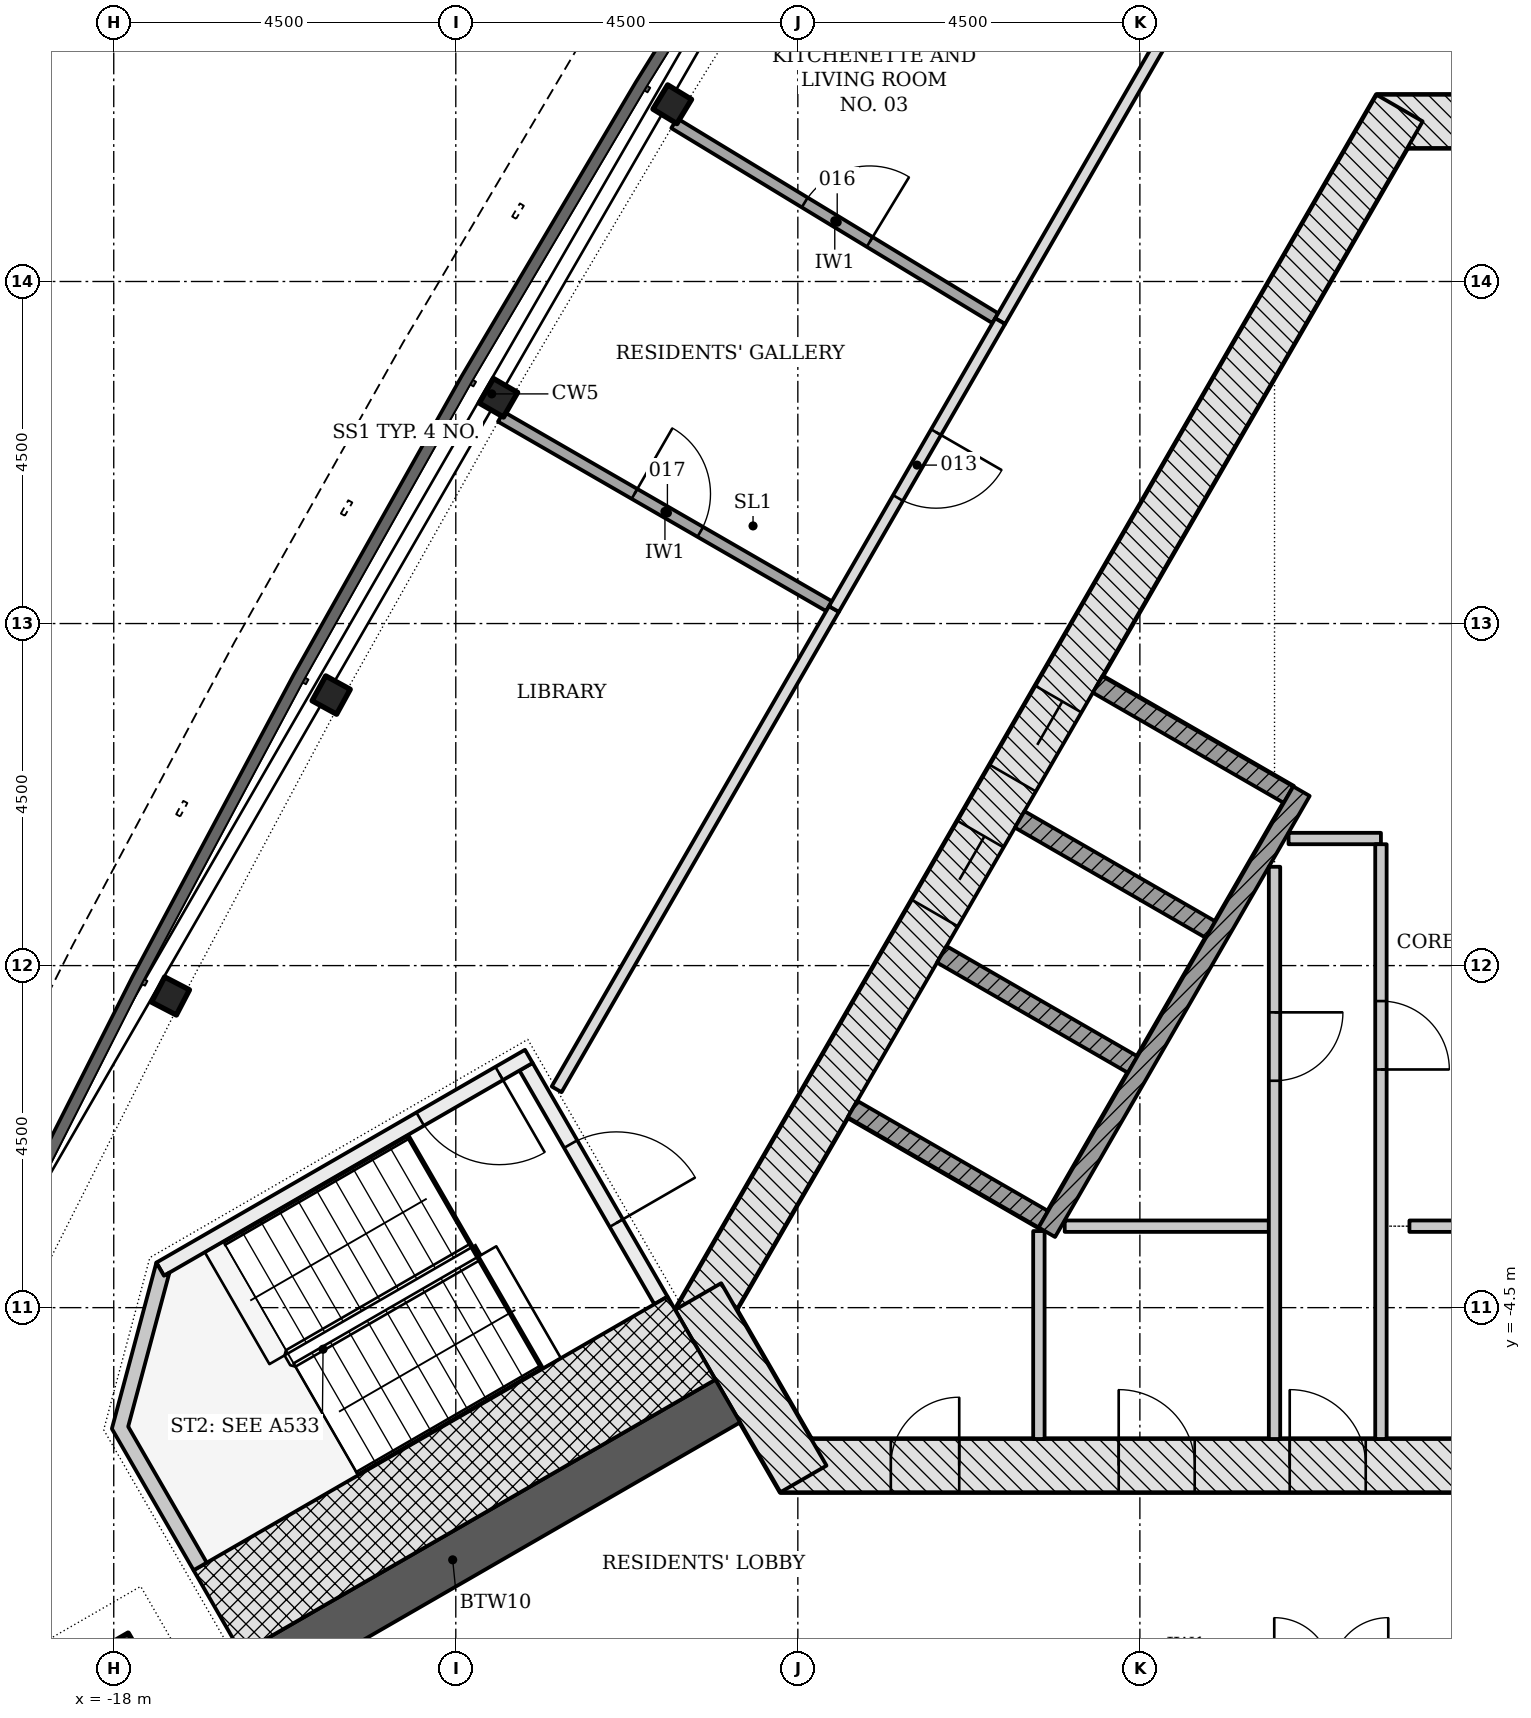
"""IFC4 building model, lengths in metres.
Left out: names, types, materials, properties, quantities, classifications, styles, units other than length and angle.
Written with IfcOpenShell. Run it as: python <this file> out.ifc"""

import sys

from ifc_helpers import new_model, si_unit, direction, frame, frame_2d, origin, origin_2d, place, context, subcontext, project, spatial, polyline, rectangle, i_section, outline, extrude, element, fill, save


model = new_model("IFC4")
c1 = context("Model", 3, precision=1e-05, world=origin(), true_north=direction((0.0, 1.0)))
c2 = subcontext(c1, "Body", "Model", "MODEL_VIEW")
j1 = project(units=[si_unit("LENGTHUNIT", "METRE"), si_unit("PLANEANGLEUNIT", "RADIAN")], contexts=[c1])
p1 = place(None, origin())
s1 = spatial("IfcSite", under=j1, at=p1, CompositionType="ELEMENT")
p2 = place(p1, origin())
s2 = spatial("IfcBuilding", under=s1, at=p2, CompositionType="ELEMENT")
p3 = place(p2, frame((0.0, 0.0, 214.8)))
s3 = spatial("IfcBuildingStorey", under=s2, at=p3, CompositionType="ELEMENT", Elevation=214.8)
p4 = place(p3, frame((-9.229, -6.578, -0.2), z_axis=(0.0, 0.0, 1.0), x_axis=(1.0, 0.0, 0.0)))
e1 = element("IfcWall", 1, at=p4, inside=s3, PredefinedType="SHEAR", context=c2, shape_type="SweptSolid", body=[
    extrude(rectangle(XDim=18.458, YDim=0.7, at=frame_2d((9.229, 0.0))), origin(), (0.0, 0.0, 1.0), 3.6),
])
p5 = place(p4, frame((6.7, 0.0, 0.2)))
e2 = element("IfcOpeningElement", 2, at=p5, cuts=e1, PredefinedType="OPENING", context=c2, shape_type="SweptSolid", body=[
    extrude(rectangle(XDim=1.0, YDim=2.1, at=frame_2d((0.5, 1.05))), frame((0.0, 0.36, 0.0), z_axis=(0.0, -1.0, 0.0), x_axis=(1.0, 0.0, 0.0)), (0.0, 0.0, 1.0), 0.72),
])
p6 = place(p4, frame((1.452, 0.0, 0.2)))
e3 = element("IfcOpeningElement", 3, at=p6, cuts=e1, PredefinedType="OPENING", context=c2, shape_type="SweptSolid", body=[
    extrude(rectangle(XDim=0.9, YDim=2.1, at=frame_2d((0.45, 1.05))), frame((0.0, 0.36, 0.0), z_axis=(0.0, -1.0, 0.0), x_axis=(1.0, 0.0, 0.0)), (0.0, 0.0, 1.0), 0.72),
])
p7 = place(p4, frame((4.45, 0.0, 0.2)))
e4 = element("IfcOpeningElement", 4, at=p7, cuts=e1, PredefinedType="OPENING", context=c2, shape_type="SweptSolid", body=[
    extrude(rectangle(XDim=1.0, YDim=2.1, at=frame_2d((0.5, 1.05))), frame((0.0, 0.36, 0.0), z_axis=(0.0, -1.0, 0.0), x_axis=(1.0, 0.0, 0.0)), (0.0, 0.0, 1.0), 0.72),
])
p8 = place(p4, frame((12.477, 0.0, 0.2)))
e5 = element("IfcOpeningElement", 5, at=p8, cuts=e1, PredefinedType="OPENING", context=c2, shape_type="SweptSolid", body=[
    extrude(rectangle(XDim=1.0, YDim=2.1, at=frame_2d((0.5, 1.05))), frame((0.0, 0.36, 0.0), z_axis=(0.0, -1.0, 0.0), x_axis=(1.0, 0.0, 0.0)), (0.0, 0.0, 1.0), 0.72),
])
p9 = place(p3, frame((1.386, 11.106, -0.2), z_axis=(0.0, 0.0, 1.0), x_axis=(-1.0, 0.0, 0.0)))
e6 = element("IfcWall", 6, at=p9, inside=s3, PredefinedType="SHEAR", context=c2, shape_type="SweptSolid", body=[
    extrude(rectangle(XDim=2.771, YDim=0.7, at=frame_2d((1.386, 0.0))), origin(), (0.0, 0.0, 1.0), 3.6),
])
p10 = place(p3, frame((-1.083, 11.281, -0.2), z_axis=(0.0, 0.0, 1.0), x_axis=(-0.500001446645, -0.866024568562, 0.0)))
e7 = element("IfcWall", 7, at=p10, inside=s3, PredefinedType="SHEAR", context=c2, shape_type="SweptSolid", body=[
    extrude(rectangle(XDim=18.458, YDim=0.7, at=frame_2d((9.229, 0.0))), origin(), (0.0, 0.0, 1.0), 3.6),
])
p11 = place(p10, frame((8.979, 0.0, 0.2)))
e8 = element("IfcOpeningElement", 8, at=p11, cuts=e7, PredefinedType="OPENING", context=c2, shape_type="SweptSolid", body=[
    extrude(rectangle(XDim=1.2, YDim=2.1, at=frame_2d((0.6, 1.05))), frame((0.0, 0.36, 0.0), z_axis=(0.0, -1.0, 0.0), x_axis=(1.0, 0.0, 0.0)), (0.0, 0.0, 1.0), 0.72),
])
p12 = place(p10, frame((11.029, 0.0, 0.2)))
e9 = element("IfcOpeningElement", 9, at=p12, cuts=e7, PredefinedType="OPENING", context=c2, shape_type="SweptSolid", body=[
    extrude(rectangle(XDim=1.2, YDim=2.1, at=frame_2d((0.6, 1.05))), frame((0.0, 0.36, 0.0), z_axis=(0.0, -1.0, 0.0), x_axis=(1.0, 0.0, 0.0)), (0.0, 0.0, 1.0), 0.72),
])
p13 = place(p3, frame((-10.311, -4.353, -0.2), z_axis=(0.0, 0.0, 1.0), x_axis=(0.500042739161, -0.866000726912, 0.0)))
e10 = element("IfcWall", 10, at=p13, inside=s3, PredefinedType="SHEAR", context=c2, shape_type="SweptSolid", body=[
    extrude(rectangle(XDim=2.771, YDim=0.7, at=frame_2d((1.386, 0.0))), origin(), (0.0, 0.0, 1.0), 3.6),
])
p14 = place(p3, frame((-9.922, -5.728, -0.2), z_axis=(0.0, 0.0, 1.0), x_axis=(-0.866030911543, -0.499990460161, 0.0)))
e11 = element("IfcWall", 11, at=p14, inside=s3, PredefinedType="SHEAR", context=c2, shape_type="SweptSolid", body=[
    extrude(rectangle(XDim=8.359, YDim=0.65, at=frame_2d((4.179, 0.0))), origin(), (0.0, 0.0, 1.0), 3.6),
])
p15 = place(p3, frame((-18.286, -10.558, -0.2), z_axis=(0.0, 0.0, 1.0), x_axis=(-0.866025403784, -0.5, 0.0)))
e12 = element("IfcColumn", 12, at=p15, inside=s3, PredefinedType="COLUMN", context=c2, shape_type="SweptSolid", body=[
    extrude(rectangle(XDim=2.6, YDim=2.6, at=origin_2d()), origin(), (0.0, 0.0, 1.0), 3.6),
])
for number, where, z_axis, x_axis in (
    (13, (-10.652, 11.332, -0.2), (0.0, 0.0, 1.0), (-0.519, -0.855, 0.0)),
    (14, (-12.939, 7.47, -0.2), (0.0, 0.0, 1.0), (-0.5, -0.866, 0.0)),
    (15, (-15.14, 3.559, -0.2), (0.0, 0.0, 1.0), (-0.481, -0.877, 0.0)),
    (16, (-17.253, -0.4, -0.2), (0.0, 0.0, 1.0), (-0.461, -0.887, 0.0)),
):
    element("IfcColumn", number, at=place(p3, frame(where, z_axis=z_axis, x_axis=x_axis)), inside=s3, PredefinedType="COLUMN", context=c2, shape_type="SweptSolid", body=[
        extrude(i_section(OverallWidth=0.373, OverallDepth=0.368, WebThickness=0.015, FlangeThickness=0.024, FilletRadius=0.015, at=origin_2d()), origin(), (0.0, 0.0, 1.0), 3.6),
    ])
for number, where, z_axis, x_axis in (
    (17, (-5.056, 3.699, -0.2), (0.0, 0.0, 1.0), (0.866, -0.5, 0.0)),
    (18, (-6.081, 1.923, -0.2), (0.0, 0.0, 1.0), (0.866, -0.5, 0.0)),
    (19, (-7.106, 0.148, -0.2), (0.0, 0.0, 1.0), (0.866, -0.5, 0.0)),
    (20, (-8.281, -1.887, -0.2), (0.0, 0.0, 1.0), (0.866, -0.5, 0.0)),
):
    element("IfcWall", number, at=place(p3, frame(where, z_axis=z_axis, x_axis=x_axis)), inside=s3, PredefinedType="PARTITIONING", context=c2, shape_type="SweptSolid", body=[
        extrude(rectangle(XDim=2.9, YDim=0.25, at=frame_2d((1.45, 0.0))), origin(), (0.0, 0.0, 1.0), 3.6),
    ])
p16 = place(p3, frame((-2.374, 2.294, 0.0), z_axis=(0.0, 0.0, 1.0), x_axis=(-0.500003174267, -0.866023571113, 0.0)))
e21 = element("IfcWall", 21, at=p16, inside=s3, PredefinedType="PARTITIONING", context=c2, shape_type="SweptSolid", body=[
    extrude(rectangle(XDim=6.7, YDim=0.25, at=frame_2d((3.35, 0.0))), origin(), (0.0, 0.0, 1.0), 3.4),
])
p17 = place(p3, frame((-5.829, -3.492, 0.0), z_axis=(0.0, 0.0, 1.0), x_axis=(0.0, -1.0, 0.0)))
e22 = element("IfcWall", 22, at=p17, inside=s3, PredefinedType="PARTITIONING", context=c2, shape_type="SweptSolid", body=[
    extrude(rectangle(XDim=2.736, YDim=0.15, at=frame_2d((1.368, 0.0))), origin(), (0.0, 0.0, 1.0), 3.4),
])
p18 = place(p3, frame((-5.489, -3.428, 0.0), z_axis=(0.0, 0.0, 1.0), x_axis=(1.0, 0.0, 0.0)))
e23 = element("IfcWall", 23, at=p18, inside=s3, PredefinedType="PARTITIONING", context=c2, shape_type="SweptSolid", body=[
    extrude(rectangle(XDim=2.685, YDim=0.15, at=frame_2d((1.343, 0.0))), origin(), (0.0, 0.0, 1.0), 3.4),
])
p19 = place(p3, frame((-2.729, 1.3, 0.0), z_axis=(0.0, 0.0, 1.0), x_axis=(0.0, -1.0, 0.0)))
e24 = element("IfcWall", 24, at=p19, inside=s3, PredefinedType="PARTITIONING", context=c2, shape_type="SweptSolid", body=[
    extrude(rectangle(XDim=7.528, YDim=0.15, at=frame_2d((3.764, 0.0))), origin(), (0.0, 0.0, 1.0), 3.4),
])
p20 = place(p19, frame((1.915, 0.0, 0.0)))
e25 = element("IfcOpeningElement", 25, at=p20, cuts=e24, PredefinedType="OPENING", context=c2, shape_type="SweptSolid", body=[
    extrude(rectangle(XDim=0.9, YDim=2.1, at=frame_2d((0.45, 1.05))), frame((0.0, 0.085, 0.0), z_axis=(0.0, -1.0, 0.0), x_axis=(1.0, 0.0, 0.0)), (0.0, 0.0, 1.0), 0.17),
])
p21 = place(p3, frame((-2.544, 1.672, 0.0), z_axis=(0.0, 0.0, 1.0), x_axis=(1.0, 0.0, 0.0)))
e26 = element("IfcWall", 26, at=p21, inside=s3, PredefinedType="PARTITIONING", context=c2, shape_type="SweptSolid", body=[
    extrude(rectangle(XDim=1.216, YDim=0.15, at=frame_2d((0.608, 0.0))), origin(), (0.0, 0.0, 1.0), 3.4),
])
p22 = place(p3, frame((-1.329, 1.597, 0.0), z_axis=(0.0, 0.0, 1.0), x_axis=(0.0, -1.0, 0.0)))
e27 = element("IfcWall", 27, at=p22, inside=s3, PredefinedType="PARTITIONING", context=c2, shape_type="SweptSolid", body=[
    extrude(rectangle(XDim=7.825, YDim=0.15, at=frame_2d((3.913, 0.0))), origin(), (0.0, 0.0, 1.0), 3.4),
])
p23 = place(p22, frame((2.063, 0.0, 0.0)))
e28 = element("IfcOpeningElement", 28, at=p23, cuts=e27, PredefinedType="OPENING", context=c2, shape_type="SweptSolid", body=[
    extrude(rectangle(XDim=0.9, YDim=2.1, at=frame_2d((0.45, 1.05))), frame((0.0, 0.085, 0.0), z_axis=(0.0, -1.0, 0.0), x_axis=(1.0, 0.0, 0.0)), (0.0, 0.0, 1.0), 0.17),
])
p24 = place(p3, frame((-0.954, -3.428, 0.0), z_axis=(0.0, 0.0, 1.0), x_axis=(1.0, 0.0, 0.0)))
e29 = element("IfcWall", 29, at=p24, inside=s3, PredefinedType="PARTITIONING", context=c2, shape_type="SweptSolid", body=[
    extrude(rectangle(XDim=10.08, YDim=0.15, at=frame_2d((5.04, 0.0))), origin(), (0.0, 0.0, 1.0), 3.4),
])
p25 = place(p3, frame((-12.576, -1.331, -0.2), z_axis=(0.0, 0.0, 1.0), x_axis=(0.499970499736, -0.8660424351, 0.0)))
e30 = element("IfcWall", 30, at=p25, inside=s3, PredefinedType="SHEAR", context=c2, shape_type="SweptSolid", body=[
    extrude(rectangle(XDim=3.55, YDim=0.2, at=frame_2d((1.775, 0.0))), origin(), (0.0, 0.0, 1.0), 3.6),
])
p26 = place(p25, frame((1.175, 0.0, 0.2)))
e31 = element("IfcOpeningElement", 31, at=p26, cuts=e30, PredefinedType="OPENING", context=c2, shape_type="SweptSolid", body=[
    extrude(rectangle(XDim=1.2, YDim=2.1, at=frame_2d((0.6, 1.05))), frame((0.0, 0.11, 0.0), z_axis=(0.0, -1.0, 0.0), x_axis=(1.0, 0.0, 0.0)), (0.0, 0.0, 1.0), 0.22),
])
p27 = place(p3, frame((-12.539, -1.194, -0.2), z_axis=(0.0, 0.0, 1.0), x_axis=(-0.866045472092, -0.499965239061, 0.0)))
e32 = element("IfcWall", 32, at=p27, inside=s3, PredefinedType="SHEAR", context=c2, shape_type="SweptSolid", body=[
    extrude(rectangle(XDim=5.6, YDim=0.2, at=frame_2d((2.8, 0.0))), origin(), (0.0, 0.0, 1.0), 3.6),
])
p28 = place(p27, frame((0.45, 0.0, 0.2)))
e33 = element("IfcOpeningElement", 33, at=p28, cuts=e32, PredefinedType="OPENING", context=c2, shape_type="SweptSolid", body=[
    extrude(rectangle(XDim=1.2, YDim=2.1, at=frame_2d((0.6, 1.05))), frame((0.0, 0.11, 0.0), z_axis=(0.0, -1.0, 0.0), x_axis=(1.0, 0.0, 0.0)), (0.0, 0.0, 1.0), 0.22),
])
p29 = place(p3, frame((-10.399, -4.901, -0.2), z_axis=(0.0, 0.0, 1.0), x_axis=(-0.866018442252, -0.500012057535, 0.0)))
e34 = element("IfcWall", 34, at=p29, inside=s3, PredefinedType="SHEAR", context=c2, shape_type="SweptSolid", body=[
    extrude(rectangle(XDim=7.2, YDim=1.261, at=frame_2d((3.6, 0.0))), origin(), (0.0, 0.0, 1.0), 3.6),
])
p30 = place(p3, frame((0.0, 0.0, -0.2)))
e35 = element("IfcWall", 35, at=p30, inside=s3, PredefinedType="SHEAR", context=c2, shape_type="SweptSolid", body=[
    extrude(outline(polyline([(-17.439, -3.907), (-18.025, -6.093), (-16.95, -7.955), (-16.777, -7.855), (-17.81, -6.065), (-17.267, -4.039), (-17.339, -4.081), (-17.339, -4.081), (-17.339, -4.081), (-17.339, -4.081), (-17.339, -4.081), (-17.339, -4.081), (-17.339, -4.081), (-17.339, -4.081), (-17.339, -4.081), (-17.339, -4.081), (-17.339, -4.081), (-17.339, -4.081), (-17.339, -4.081), (-17.339, -4.081), (-17.339, -4.081), (-17.339, -4.081), (-17.339, -4.081), (-17.439, -3.907)])), origin(), (0.0, 0.0, 1.0), 3.6),
])
p31 = place(p3, frame((-0.325, 18.894, 0.0), z_axis=(0.0, 0.0, 1.0), x_axis=(-0.50000126085, -0.866024675831, 0.0)))
e36 = element("IfcWall", 36, at=p31, inside=s3, PredefinedType="PARTITIONING", context=c2, shape_type="SweptSolid", body=[
    extrude(rectangle(XDim=12.027, YDim=0.15, at=frame_2d((6.013, 0.0))), origin(), (0.0, 0.0, 1.0), 2.852),
])
p32 = place(p3, frame((-8.525, 4.691, 0.0), z_axis=(0.0, 0.0, 1.0), x_axis=(-0.499986021771, -0.866033473968, 0.0)))
e37 = element("IfcWall", 37, at=p32, inside=s3, PredefinedType="PARTITIONING", context=c2, shape_type="SweptSolid", body=[
    extrude(rectangle(XDim=7.297, YDim=0.15, at=frame_2d((3.648, 0.0))), origin(), (0.0, 0.0, 1.0), 2.852),
])
p33 = place(p3, frame((-10.626, 11.082, 0.0), z_axis=(0.0, 0.0, 1.0), x_axis=(0.854742891139, -0.519051625609, 0.0)))
e38 = element("IfcWall", 38, at=p33, inside=s3, PredefinedType="PARTITIONING", context=c2, shape_type="SweptSolid", body=[
    extrude(rectangle(XDim=4.941, YDim=0.15, at=frame_2d((2.471, 0.0))), origin(), (0.0, 0.0, 1.0), 3.4),
])
p34 = place(p33, frame((2.008, 0.0, 0.0)))
e39 = element("IfcOpeningElement", 39, at=p34, cuts=e38, PredefinedType="OPENING", context=c2, shape_type="SweptSolid", body=[
    extrude(rectangle(XDim=1.0, YDim=2.1, at=frame_2d((0.5, 1.05))), frame((0.0, 0.085, 0.0), z_axis=(0.0, -1.0, 0.0), x_axis=(1.0, 0.0, 0.0)), (0.0, 0.0, 1.0), 0.17),
])
p35 = place(p3, frame((-12.907, 7.221, 0.0), z_axis=(0.0, 0.0, 1.0), x_axis=(0.866031443676, -0.499989538455, 0.0)))
e40 = element("IfcWall", 40, at=p35, inside=s3, PredefinedType="PARTITIONING", context=c2, shape_type="SweptSolid", body=[
    extrude(rectangle(XDim=4.985, YDim=0.15, at=frame_2d((2.492, 0.0))), origin(), (0.0, 0.0, 1.0), 3.4),
])
p36 = place(p35, frame((2.03, 0.0, 0.0)))
e41 = element("IfcOpeningElement", 41, at=p36, cuts=e40, PredefinedType="OPENING", context=c2, shape_type="SweptSolid", body=[
    extrude(rectangle(XDim=1.0, YDim=2.1, at=frame_2d((0.5, 1.05))), frame((0.0, 0.085, 0.0), z_axis=(0.0, -1.0, 0.0), x_axis=(1.0, 0.0, 0.0)), (0.0, 0.0, 1.0), 0.17),
])
p37 = place(p3, frame((-6.338, 8.478, 0.0), z_axis=(0.0, 0.0, 1.0), x_axis=(-0.500005971936, -0.866021955858, 0.0)))
e42 = element("IfcWall", 42, at=p37, inside=s3, PredefinedType="PARTITIONING", context=c2, shape_type="SweptSolid", body=[
    extrude(rectangle(XDim=4.373, YDim=0.15, at=frame_2d((2.187, 0.0))), origin(), (0.0, 0.0, 1.0), 2.852),
])
p38 = place(p37, frame((1.687, 0.0, 0.0)))
e43 = element("IfcOpeningElement", 43, at=p38, cuts=e42, PredefinedType="OPENING", context=c2, shape_type="SweptSolid", body=[
    extrude(rectangle(XDim=1.0, YDim=2.1, at=frame_2d((0.5, 1.05))), frame((0.0, 0.085, 0.0), z_axis=(0.0, -1.0, 0.0), x_axis=(1.0, 0.0, 0.0)), (0.0, 0.0, 1.0), 0.17),
])
p39 = place(p11, origin())
e44 = element("IfcDoor", 44, at=p39, inside=s3, OperationType="DOUBLE_DOOR_SLIDING", PredefinedType="DOOR", context=c2, shape_type="SweptSolid", body=[
    extrude(rectangle(XDim=1.2, YDim=2.1, at=frame_2d((0.6, 1.05))), frame((0.0, 0.025, 0.0), z_axis=(0.0, -1.0, 0.0), x_axis=(1.0, 0.0, 0.0)), (0.0, 0.0, 1.0), 0.05),
])
fill(e8, e44)
p40 = place(p12, origin())
e45 = element("IfcDoor", 45, at=p40, inside=s3, OperationType="DOUBLE_DOOR_SLIDING", PredefinedType="DOOR", context=c2, shape_type="SweptSolid", body=[
    extrude(rectangle(XDim=1.2, YDim=2.1, at=frame_2d((0.6, 1.05))), frame((0.0, 0.025, 0.0), z_axis=(0.0, -1.0, 0.0), x_axis=(1.0, 0.0, 0.0)), (0.0, 0.0, 1.0), 0.05),
])
fill(e9, e45)
p41 = place(p5, origin())
e46 = element("IfcDoor", 46, at=p41, inside=s3, OperationType="SINGLE_SWING_LEFT", PredefinedType="DOOR", context=c2, shape_type="SweptSolid", body=[
    extrude(rectangle(XDim=1.0, YDim=2.1, at=frame_2d((0.5, 1.05))), frame((0.0, 0.075, 0.0), z_axis=(0.0, -1.0, 0.0), x_axis=(1.0, 0.0, 0.0)), (0.0, 0.0, 1.0), 0.15),
])
fill(e2, e46)
p42 = place(p6, origin())
e47 = element("IfcDoor", 47, at=p42, inside=s3, OperationType="SINGLE_SWING_RIGHT", PredefinedType="DOOR", context=c2, shape_type="SweptSolid", body=[
    extrude(rectangle(XDim=0.9, YDim=2.1, at=frame_2d((0.45, 1.05))), frame((0.0, 0.075, 0.0), z_axis=(0.0, -1.0, 0.0), x_axis=(1.0, 0.0, 0.0)), (0.0, 0.0, 1.0), 0.15),
])
fill(e3, e47)
p43 = place(p7, origin())
e48 = element("IfcDoor", 48, at=p43, inside=s3, OperationType="SINGLE_SWING_LEFT", PredefinedType="DOOR", context=c2, shape_type="SweptSolid", body=[
    extrude(rectangle(XDim=1.0, YDim=2.1, at=frame_2d((0.5, 1.05))), frame((0.0, 0.075, 0.0), z_axis=(0.0, -1.0, 0.0), x_axis=(1.0, 0.0, 0.0)), (0.0, 0.0, 1.0), 0.15),
])
fill(e4, e48)
p44 = place(p20, origin())
e49 = element("IfcDoor", 49, at=p44, inside=s3, OperationType="SINGLE_SWING_LEFT", PredefinedType="DOOR", context=c2, shape_type="SweptSolid", body=[
    extrude(rectangle(XDim=0.9, YDim=2.1, at=frame_2d((0.45, 1.05))), frame((0.0, 0.025, 0.0), z_axis=(0.0, -1.0, 0.0), x_axis=(1.0, 0.0, 0.0)), (0.0, 0.0, 1.0), 0.05),
])
fill(e25, e49)
p45 = place(p23, origin())
e50 = element("IfcDoor", 50, at=p45, inside=s3, OperationType="SINGLE_SWING_RIGHT", PredefinedType="DOOR", context=c2, shape_type="SweptSolid", body=[
    extrude(rectangle(XDim=0.9, YDim=2.1, at=frame_2d((0.45, 1.05))), frame((0.0, 0.025, 0.0), z_axis=(0.0, -1.0, 0.0), x_axis=(1.0, 0.0, 0.0)), (0.0, 0.0, 1.0), 0.05),
])
fill(e28, e50)
p46 = place(p26, origin())
e51 = element("IfcDoor", 51, at=p46, inside=s3, OperationType="SINGLE_SWING_RIGHT", PredefinedType="DOOR", context=c2, shape_type="SweptSolid", body=[
    extrude(rectangle(XDim=1.2, YDim=2.1, at=frame_2d((0.6, 1.05))), frame((0.0, 0.025, 0.0), z_axis=(0.0, -1.0, 0.0), x_axis=(1.0, 0.0, 0.0)), (0.0, 0.0, 1.0), 0.05),
])
fill(e31, e51)
p47 = place(p28, origin())
e52 = element("IfcDoor", 52, at=p47, inside=s3, OperationType="SINGLE_SWING_LEFT", PredefinedType="DOOR", context=c2, shape_type="SweptSolid", body=[
    extrude(rectangle(XDim=1.2, YDim=2.1, at=frame_2d((0.6, 1.05))), frame((0.0, 0.025, 0.0), z_axis=(0.0, -1.0, 0.0), x_axis=(1.0, 0.0, 0.0)), (0.0, 0.0, 1.0), 0.05),
])
fill(e33, e52)
p48 = place(p38, origin())
e53 = element("IfcDoor", 53, at=p48, inside=s3, OperationType="SINGLE_SWING_LEFT", PredefinedType="DOOR", context=c2, shape_type="SweptSolid", body=[
    extrude(rectangle(XDim=1.0, YDim=2.1, at=frame_2d((0.5, 1.05))), frame((0.0, 0.025, 0.0), z_axis=(0.0, -1.0, 0.0), x_axis=(1.0, 0.0, 0.0)), (0.0, 0.0, 1.0), 0.05),
])
fill(e43, e53)
p49 = place(p34, origin())
e54 = element("IfcDoor", 54, at=p49, inside=s3, OperationType="SINGLE_SWING_RIGHT", PredefinedType="DOOR", context=c2, shape_type="SweptSolid", body=[
    extrude(rectangle(XDim=1.0, YDim=2.1, at=frame_2d((0.5, 1.05))), frame((0.0, 0.025, 0.0), z_axis=(0.0, -1.0, 0.0), x_axis=(1.0, 0.0, 0.0)), (0.0, 0.0, 1.0), 0.05),
])
fill(e39, e54)
p50 = place(p36, origin())
e55 = element("IfcDoor", 55, at=p50, inside=s3, OperationType="SINGLE_SWING_LEFT", PredefinedType="DOOR", context=c2, shape_type="SweptSolid", body=[
    extrude(rectangle(XDim=1.0, YDim=2.1, at=frame_2d((0.5, 1.05))), frame((0.0, 0.025, 0.0), z_axis=(0.0, -1.0, 0.0), x_axis=(1.0, 0.0, 0.0)), (0.0, 0.0, 1.0), 0.05),
])
fill(e41, e55)
save(model, sys.argv[1])
